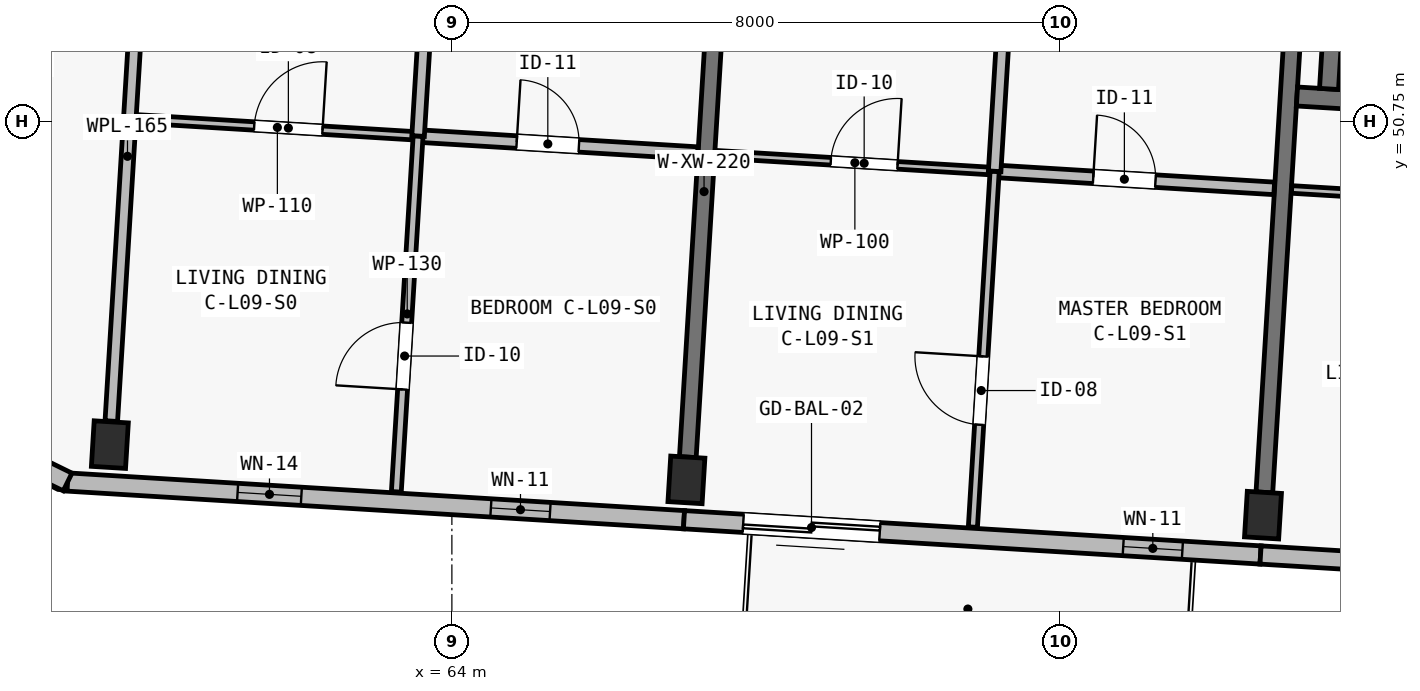
"""IFC4 building model, lengths in metres.
Left out: names, types, materials, properties, quantities, classifications, styles, units other than length and angle.
Written with IfcOpenShell. Run it as: python <this file> out.ifc"""

import sys

from ifc_helpers import new_model, si_unit, direction, frame, frame_2d, origin, origin_2d, place, context, subcontext, project, spatial, polyline, rectangle, outline, extrude, element, fill, save


model = new_model("IFC4")
c1 = context("Model", 3, precision=1e-05, world=origin(), true_north=direction((0.0, 1.0)))
c2 = subcontext(c1, "Body", "Model", "MODEL_VIEW")
j1 = project(units=[si_unit("LENGTHUNIT", "METRE"), si_unit("PLANEANGLEUNIT", "RADIAN")], contexts=[c1])
p1 = place(None, origin())
s1 = spatial("IfcSite", under=j1, at=p1, CompositionType="ELEMENT")
p2 = place(p1, origin())
s2 = spatial("IfcBuilding", under=s1, at=p2, CompositionType="ELEMENT")
p3 = place(p2, frame((0.0, 0.0, 31.15)))
s3 = spatial("IfcBuildingStorey", under=s2, at=p3, CompositionType="ELEMENT", Elevation=31.15)
p4 = place(p3, frame((59.5, 46.5, 0.0), z_axis=(0.0, 0.0, 1.0), x_axis=(0.998134798422, -0.061048539535, 0.0)))
e1 = element("IfcColumn", 1, at=p4, inside=s3, PredefinedType="COLUMN", context=c2, shape_type="SweptSolid", body=[
    extrude(rectangle(XDim=0.45, YDim=0.6, at=origin_2d()), origin(), (0.0, 0.0, 1.0), 6.895),
])
for number, where, z_axis, x_axis in (
    (2, (67.086, 46.036, 0.0), (0.0, 0.0, 1.0), (0.998, -0.061, 0.0)),
    (3, (74.672, 45.572, 0.0), (0.0, 0.0, 1.0), (0.998, -0.061, 0.0)),
):
    element("IfcColumn", number, at=place(p3, frame(where, z_axis=z_axis, x_axis=x_axis)), inside=s3, PredefinedType="COLUMN", context=c2, shape_type="SweptSolid", body=[
        extrude(rectangle(XDim=0.45, YDim=0.6, at=origin_2d()), origin(), (0.0, 0.0, 1.0), 3.25),
    ])
p5 = place(p3, frame((67.104, 46.335, 0.0), z_axis=(0.0, 0.0, 1.0), x_axis=(0.061034188237, 0.998135676081, 0.0)))
e4 = element("IfcWall", 4, at=p5, inside=s3, PredefinedType="SHEAR", context=c2, shape_type="SweptSolid", body=[
    extrude(rectangle(XDim=7.0, YDim=0.22, at=frame_2d((3.5, 0.0))), origin(), (0.0, 0.0, 1.0), 2.5),
])
p6 = place(p3, frame((74.69, 45.872, 0.0), z_axis=(0.0, 0.0, 1.0), x_axis=(0.061036313012, 0.998135546153, 0.0)))
e5 = element("IfcWall", 5, at=p6, inside=s3, PredefinedType="SHEAR", context=c2, shape_type="SweptSolid", body=[
    extrude(rectangle(XDim=7.0, YDim=0.22, at=frame_2d((3.5, 0.0))), origin(), (0.0, 0.0, 1.0), 2.5),
])
p7 = place(p3, frame((75.119, 51.08, 0.0), z_axis=(0.0, 0.0, 1.0), x_axis=(0.998133370443, -0.061071882298, 0.0)))
e6 = element("IfcWall", 6, at=p7, inside=s3, PredefinedType="SHEAR", context=c2, shape_type="SweptSolid", body=[
    extrude(rectangle(XDim=2.99, YDim=0.25, at=frame_2d((1.495, 0.0))), origin(), (0.0, 0.0, 1.0), 3.25),
])
p8 = place(p3, frame((75.541, 51.179, 0.0), z_axis=(0.0, 0.0, 1.0), x_axis=(0.061037062968, 0.998135500293, 0.0)))
e7 = element("IfcWall", 7, at=p8, inside=s3, PredefinedType="SHEAR", context=c2, shape_type="SweptSolid", body=[
    extrude(rectangle(XDim=1.7, YDim=0.25, at=frame_2d((0.85, 0.0))), origin(), (0.0, 0.0, 1.0), 3.25),
])
p9 = place(p3, frame((67.054, 45.512, 0.0), z_axis=(0.0, 0.0, 1.0), x_axis=(-0.998134248939, 0.061057522844, 0.0)))
e8 = element("IfcWall", 8, at=p9, inside=s3, PredefinedType="SOLIDWALL", context=c2, shape_type="SweptSolid", body=[
    extrude(outline(polyline([(0.0, 0.0), (8.125, 0.0), (8.125, 7.561), (0.0, 5.998), (0.0, 0.0)])), frame((0.0, 0.12, 0.0), z_axis=(0.0, -1.0, 0.0), x_axis=(1.0, 0.0, 0.0)), (0.0, 0.0, 1.0), 0.24),
])
p10 = place(p9, frame((1.765, 0.0, 0.42)))
e9 = element("IfcOpeningElement", 9, at=p10, cuts=e8, PredefinedType="OPENING", context=c2, shape_type="SweptSolid", body=[
    extrude(rectangle(XDim=0.78, YDim=2.2, at=frame_2d((0.39, 1.1))), frame((0.0, 0.135, 0.0), z_axis=(0.0, -1.0, 0.0), x_axis=(1.0, 0.0, 0.0)), (0.0, 0.0, 1.0), 0.27),
])
p11 = place(p9, frame((5.044, 0.0, 0.42)))
e10 = element("IfcOpeningElement", 10, at=p11, cuts=e8, PredefinedType="OPENING", context=c2, shape_type="SweptSolid", body=[
    extrude(rectangle(XDim=0.84, YDim=2.28, at=frame_2d((0.42, 1.14))), frame((0.0, 0.135, 0.0), z_axis=(0.0, -1.0, 0.0), x_axis=(1.0, 0.0, 0.0)), (0.0, 0.0, 1.0), 0.27),
])
p12 = place(p3, frame((74.64, 45.048, 0.0), z_axis=(0.0, 0.0, 1.0), x_axis=(-0.998135669243, 0.061034300063, 0.0)))
e11 = element("IfcWall", 11, at=p12, inside=s3, PredefinedType="SOLIDWALL", context=c2, shape_type="SweptSolid", body=[
    extrude(outline(polyline([(0.0, 0.0), (7.6, 0.0), (7.6, 5.998), (0.0, 4.535), (0.0, 0.0)])), frame((0.0, 0.12, 0.0), z_axis=(0.0, -1.0, 0.0), x_axis=(1.0, 0.0, 0.0)), (0.0, 0.0, 1.0), 0.24),
])
p13 = place(p12, frame((5.019, 0.0, 0.0)))
e12 = element("IfcOpeningElement", 12, at=p13, cuts=e11, PredefinedType="OPENING", context=c2, shape_type="SweptSolid", body=[
    extrude(rectangle(XDim=1.8, YDim=2.12, at=frame_2d((0.9, 1.06))), frame((0.0, 0.135, 0.0), z_axis=(0.0, -1.0, 0.0), x_axis=(1.0, 0.0, 0.0)), (0.0, 0.0, 1.0), 0.27),
])
p14 = place(p12, frame((1.03, 0.0, 0.46)))
e13 = element("IfcOpeningElement", 13, at=p14, cuts=e11, PredefinedType="OPENING", context=c2, shape_type="SweptSolid", body=[
    extrude(rectangle(XDim=0.78, YDim=2.2, at=frame_2d((0.39, 1.1))), frame((0.0, 0.135, 0.0), z_axis=(0.0, -1.0, 0.0), x_axis=(1.0, 0.0, 0.0)), (0.0, 0.0, 1.0), 0.27),
])
p15 = place(p3, frame((82.75, 44.552, 0.0), z_axis=(0.0, 0.0, 1.0), x_axis=(-0.998134248939, 0.061057522844, 0.0)))
e14 = element("IfcWall", 14, at=p15, inside=s3, PredefinedType="SOLIDWALL", context=c2, shape_type="SweptSolid", body=[
    extrude(outline(polyline([(0.0, 0.0), (8.125, 0.0), (8.125, 4.535), (0.0, 2.972), (0.0, 0.0)])), frame((0.0, 0.12, 0.0), z_axis=(0.0, -1.0, 0.0), x_axis=(1.0, 0.0, 0.0)), (0.0, 0.0, 1.0), 0.24),
])
p16 = place(p15, frame((1.251, 0.0, 0.52)))
e15 = element("IfcOpeningElement", 15, at=p16, cuts=e14, PredefinedType="OPENING", context=c2, shape_type="SweptSolid", body=[
    extrude(rectangle(XDim=0.68, YDim=2.24, at=frame_2d((0.34, 1.12))), frame((0.0, 0.135, 0.0), z_axis=(0.0, -1.0, 0.0), x_axis=(1.0, 0.0, 0.0)), (0.0, 0.0, 1.0), 0.27),
])
p17 = place(p15, frame((4.056, 0.0, 0.52)))
e16 = element("IfcOpeningElement", 16, at=p17, cuts=e14, PredefinedType="OPENING", context=c2, shape_type="SweptSolid", body=[
    extrude(rectangle(XDim=0.74, YDim=2.26, at=frame_2d((0.37, 1.13))), frame((0.0, 0.135, 0.0), z_axis=(0.0, -1.0, 0.0), x_axis=(1.0, 0.0, 0.0)), (0.0, 0.0, 1.0), 0.27),
])
p18 = place(p3, frame((58.944, 46.008, 0.0), z_axis=(0.0, 0.0, 1.0), x_axis=(-0.897775054318, 0.440454256246, 0.0)))
e17 = element("IfcWall", 17, at=p18, inside=s3, PredefinedType="SOLIDWALL", context=c2, shape_type="SweptSolid", body=[
    extrude(outline(polyline([(0.0, 0.0), (8.12, 0.0), (8.12, 9.003), (0.0, 7.561), (0.0, 0.0)])), frame((0.0, 0.13, 0.0), z_axis=(0.0, -1.0, 0.0), x_axis=(1.0, 0.0, 0.0)), (0.0, 0.0, 1.0), 0.26),
])
p19 = place(p18, frame((2.63, 0.0, 0.52)))
e18 = element("IfcOpeningElement", 18, at=p19, cuts=e17, PredefinedType="OPENING", context=c2, shape_type="SweptSolid", body=[
    extrude(rectangle(XDim=0.76, YDim=2.34, at=frame_2d((0.38, 1.17))), frame((0.0, 0.145, 0.0), z_axis=(0.0, -1.0, 0.0), x_axis=(1.0, 0.0, 0.0)), (0.0, 0.0, 1.0), 0.29),
])
p20 = place(p18, frame((4.531, 0.0, 0.45)))
e19 = element("IfcOpeningElement", 19, at=p20, cuts=e17, PredefinedType="OPENING", context=c2, shape_type="SweptSolid", body=[
    extrude(rectangle(XDim=0.6, YDim=2.22, at=frame_2d((0.3, 1.11))), frame((0.0, 0.145, 0.0), z_axis=(0.0, -1.0, 0.0), x_axis=(1.0, 0.0, 0.0)), (0.0, 0.0, 1.0), 0.29),
])
p21 = place(p3, frame((51.654, 49.585, 0.0), z_axis=(0.0, 0.0, 1.0), x_axis=(0.448621989068, 0.893721607059, 0.0)))
e20 = element("IfcWall", 20, at=p21, inside=s3, PredefinedType="SOLIDWALL", context=c2, shape_type="SweptSolid", body=[
    extrude(outline(polyline([(0.0, 0.0), (19.061, 0.0), (19.06, 7.561), (0.0, 9.003), (0.0, 0.0)])), frame((0.0, 0.13, 0.0), z_axis=(0.0, -1.0, 0.0), x_axis=(1.0, 0.0, 0.0)), (0.0, 0.0, 1.0), 0.26),
])
p22 = place(p21, frame((2.63, 0.0, 0.52)))
e21 = element("IfcOpeningElement", 21, at=p22, cuts=e20, PredefinedType="OPENING", context=c2, shape_type="SweptSolid", body=[
    extrude(rectangle(XDim=0.76, YDim=2.34, at=frame_2d((0.38, 1.17))), frame((0.0, 0.145, 0.0), z_axis=(0.0, -1.0, 0.0), x_axis=(1.0, 0.0, 0.0)), (0.0, 0.0, 1.0), 0.29),
])
p23 = place(p21, frame((15.47, 0.0, 0.45)))
e22 = element("IfcOpeningElement", 22, at=p23, cuts=e20, PredefinedType="OPENING", context=c2, shape_type="SweptSolid", body=[
    extrude(rectangle(XDim=0.6, YDim=2.22, at=frame_2d((0.3, 1.11))), frame((0.0, 0.145, 0.0), z_axis=(0.0, -1.0, 0.0), x_axis=(1.0, 0.0, 0.0)), (0.0, 0.0, 1.0), 0.29),
])
p24 = place(p3, frame((59.519, 46.809, 0.0), z_axis=(0.0, 0.0, 1.0), x_axis=(0.061034681366, 0.998135645927, 0.0)))
e23 = element("IfcWall", 23, at=p24, inside=s3, PredefinedType="PLUMBINGWALL", context=c2, shape_type="SweptSolid", body=[
    extrude(rectangle(XDim=6.98, YDim=0.165, at=frame_2d((3.49, 0.0))), origin(), (0.0, 0.0, 1.0), 3.15),
])
p25 = place(p3, frame((59.852, 50.786, 0.0), z_axis=(0.0, 0.0, 1.0), x_axis=(0.998137662841, -0.061001688651, 0.0)))
e24 = element("IfcWall", 24, at=p25, inside=s3, PredefinedType="PARTITIONING", context=c2, shape_type="SweptSolid", body=[
    extrude(rectangle(XDim=3.71, YDim=0.11, at=frame_2d((1.855, 0.0))), origin(), (0.0, 0.0, 1.0), 3.15),
])
p26 = place(p25, frame((1.55, 0.0, 0.0)))
e25 = element("IfcOpeningElement", 25, at=p26, cuts=e24, PredefinedType="OPENING", context=c2, shape_type="SweptSolid", body=[
    extrude(rectangle(XDim=0.9, YDim=2.1, at=frame_2d((0.45, 1.05))), frame((0.0, 0.07, 0.0), z_axis=(0.0, -1.0, 0.0), x_axis=(1.0, 0.0, 0.0)), (0.0, 0.0, 1.0), 0.14),
])
p27 = place(p3, frame((63.555, 50.56, 0.0), z_axis=(0.0, 0.0, 1.0), x_axis=(0.998132682596, -0.061083123148, 0.0)))
e26 = element("IfcWall", 26, at=p27, inside=s3, PredefinedType="PLUMBINGWALL", context=c2, shape_type="SweptSolid", body=[
    extrude(rectangle(XDim=3.685, YDim=0.165, at=frame_2d((1.843, 0.0))), origin(), (0.0, 0.0, 1.0), 3.15),
])
p28 = place(p27, frame((1.3, 0.0, 0.0)))
e27 = element("IfcOpeningElement", 27, at=p28, cuts=e26, PredefinedType="OPENING", context=c2, shape_type="SweptSolid", body=[
    extrude(rectangle(XDim=0.82, YDim=2.08, at=frame_2d((0.41, 1.04))), frame((0.0, 0.097, 0.0), z_axis=(0.0, -1.0, 0.0), x_axis=(1.0, 0.0, 0.0)), (0.0, 0.0, 1.0), 0.195),
])
p29 = place(p3, frame((63.269, 45.879, 0.0), z_axis=(0.0, 0.0, 1.0), x_axis=(0.061059262019, 0.998134142549, 0.0)))
e28 = element("IfcWall", 28, at=p29, inside=s3, PredefinedType="PARTITIONING", context=c2, shape_type="SweptSolid", body=[
    extrude(rectangle(XDim=4.69, YDim=0.13, at=frame_2d((2.345, 0.0))), origin(), (0.0, 0.0, 1.0), 3.15),
])
p30 = place(p29, frame((1.35, 0.0, 0.0)))
e29 = element("IfcOpeningElement", 29, at=p30, cuts=e28, PredefinedType="OPENING", context=c2, shape_type="SweptSolid", body=[
    extrude(rectangle(XDim=0.88, YDim=2.1, at=frame_2d((0.44, 1.05))), frame((0.0, 0.08, 0.0), z_axis=(0.0, -1.0, 0.0), x_axis=(1.0, 0.0, 0.0)), (0.0, 0.0, 1.0), 0.16),
])
p31 = place(p3, frame((63.555, 50.56, 0.0), z_axis=(0.0, 0.0, 1.0), x_axis=(0.061038003798, 0.998135442759, 0.0)))
e30 = element("IfcWall", 30, at=p31, inside=s3, PredefinedType="PLUMBINGWALL", context=c2, shape_type="SweptSolid", body=[
    extrude(rectangle(XDim=3.72, YDim=0.165, at=frame_2d((1.86, 0.0))), origin(), (0.0, 0.0, 1.0), 3.15),
])
p32 = place(p3, frame((67.463, 50.321, 0.0), z_axis=(0.0, 0.0, 1.0), x_axis=(0.998132682596, -0.061083123148, 0.0)))
e31 = element("IfcWall", 31, at=p32, inside=s3, PredefinedType="PARTITIONING", context=c2, shape_type="SweptSolid", body=[
    extrude(rectangle(XDim=3.685, YDim=0.1, at=frame_2d((1.843, 0.0))), origin(), (0.0, 0.0, 1.0), 3.15),
])
p33 = place(p32, frame((1.525, 0.0, 0.0)))
e32 = element("IfcOpeningElement", 32, at=p33, cuts=e31, PredefinedType="OPENING", context=c2, shape_type="SweptSolid", body=[
    extrude(rectangle(XDim=0.88, YDim=2.1, at=frame_2d((0.44, 1.05))), frame((0.0, 0.065, 0.0), z_axis=(0.0, -1.0, 0.0), x_axis=(1.0, 0.0, 0.0)), (0.0, 0.0, 1.0), 0.13),
])
p34 = place(p3, frame((71.141, 50.096, 0.0), z_axis=(0.0, 0.0, 1.0), x_axis=(0.998136472989, -0.061021154439, 0.0)))
e33 = element("IfcWall", 33, at=p34, inside=s3, PredefinedType="PLUMBINGWALL", context=c2, shape_type="SweptSolid", body=[
    extrude(rectangle(XDim=3.685, YDim=0.165, at=frame_2d((1.842, 0.0))), origin(), (0.0, 0.0, 1.0), 3.15),
])
p35 = place(p34, frame((1.3, 0.0, 0.0)))
e34 = element("IfcOpeningElement", 34, at=p35, cuts=e33, PredefinedType="OPENING", context=c2, shape_type="SweptSolid", body=[
    extrude(rectangle(XDim=0.82, YDim=2.08, at=frame_2d((0.41, 1.04))), frame((0.0, 0.097, 0.0), z_axis=(0.0, -1.0, 0.0), x_axis=(1.0, 0.0, 0.0)), (0.0, 0.0, 1.0), 0.195),
])
p36 = place(p3, frame((70.855, 45.415, 0.0), z_axis=(0.0, 0.0, 1.0), x_axis=(0.061062434628, 0.998133948465, 0.0)))
e35 = element("IfcWall", 35, at=p36, inside=s3, PredefinedType="PARTITIONING", context=c2, shape_type="SweptSolid", body=[
    extrude(rectangle(XDim=4.69, YDim=0.12, at=frame_2d((2.345, 0.0))), origin(), (0.0, 0.0, 1.0), 3.15),
])
p37 = place(p36, frame((1.35, 0.0, 0.0)))
e36 = element("IfcOpeningElement", 36, at=p37, cuts=e35, PredefinedType="OPENING", context=c2, shape_type="SweptSolid", body=[
    extrude(rectangle(XDim=0.9, YDim=2.1, at=frame_2d((0.45, 1.05))), frame((0.0, 0.075, 0.0), z_axis=(0.0, -1.0, 0.0), x_axis=(1.0, 0.0, 0.0)), (0.0, 0.0, 1.0), 0.15),
])
p38 = place(p3, frame((71.141, 50.096, 0.0), z_axis=(0.0, 0.0, 1.0), x_axis=(0.061034005467, 0.998135687257, 0.0)))
e37 = element("IfcWall", 37, at=p38, inside=s3, PredefinedType="PLUMBINGWALL", context=c2, shape_type="SweptSolid", body=[
    extrude(rectangle(XDim=3.72, YDim=0.165, at=frame_2d((1.86, 0.0))), origin(), (0.0, 0.0, 1.0), 3.15),
])
p39 = place(p3, frame((75.049, 49.857, 0.0), z_axis=(0.0, 0.0, 1.0), x_axis=(0.998135637207, -0.061034823981, 0.0)))
e38 = element("IfcWall", 38, at=p39, inside=s3, PredefinedType="PARTITIONING", context=c2, shape_type="SweptSolid", body=[
    extrude(rectangle(XDim=5.08, YDim=0.1, at=frame_2d((2.54, 0.0))), origin(), (0.0, 0.0, 1.0), 3.018),
])
p40 = place(p39, frame((3.595, 0.0, 0.0)))
e39 = element("IfcOpeningElement", 39, at=p40, cuts=e38, PredefinedType="OPENING", context=c2, shape_type="SweptSolid", body=[
    extrude(rectangle(XDim=0.88, YDim=2.1, at=frame_2d((0.44, 1.05))), frame((0.0, 0.065, 0.0), z_axis=(0.0, -1.0, 0.0), x_axis=(1.0, 0.0, 0.0)), (0.0, 0.0, 1.0), 0.13),
])
p41 = place(p10, origin())
e40 = element("IfcWindow", 40, at=p41, inside=s3, PartitioningType="SINGLE_PANEL", PredefinedType="WINDOW", context=c2, shape_type="SweptSolid", body=[
    extrude(rectangle(XDim=0.78, YDim=2.2, at=frame_2d((0.39, 1.1))), frame((0.0, 0.03, 0.0), z_axis=(0.0, -1.0, 0.0), x_axis=(1.0, 0.0, 0.0)), (0.0, 0.0, 1.0), 0.06),
])
fill(e9, e40)
p42 = place(p11, origin())
e41 = element("IfcWindow", 41, at=p42, inside=s3, PartitioningType="SINGLE_PANEL", PredefinedType="WINDOW", context=c2, shape_type="SweptSolid", body=[
    extrude(rectangle(XDim=0.84, YDim=2.28, at=frame_2d((0.42, 1.14))), frame((0.0, 0.03, 0.0), z_axis=(0.0, -1.0, 0.0), x_axis=(1.0, 0.0, 0.0)), (0.0, 0.0, 1.0), 0.06),
])
fill(e10, e41)
p43 = place(p13, origin())
e42 = element("IfcDoor", 42, at=p43, inside=s3, OperationType="SLIDING_TO_LEFT", PredefinedType="DOOR", context=c2, shape_type="SweptSolid", body=[
    extrude(rectangle(XDim=1.8, YDim=2.12, at=frame_2d((0.9, 1.06))), frame((0.0, 0.025, 0.0), z_axis=(0.0, -1.0, 0.0), x_axis=(1.0, 0.0, 0.0)), (0.0, 0.0, 1.0), 0.05),
])
fill(e12, e42)
p44 = place(p14, origin())
e43 = element("IfcWindow", 43, at=p44, inside=s3, PartitioningType="SINGLE_PANEL", PredefinedType="WINDOW", context=c2, shape_type="SweptSolid", body=[
    extrude(rectangle(XDim=0.78, YDim=2.2, at=frame_2d((0.39, 1.1))), frame((0.0, 0.03, 0.0), z_axis=(0.0, -1.0, 0.0), x_axis=(1.0, 0.0, 0.0)), (0.0, 0.0, 1.0), 0.06),
])
fill(e13, e43)
p45 = place(p26, origin())
e44 = element("IfcDoor", 44, at=p45, inside=s3, OperationType="SINGLE_SWING_RIGHT", PredefinedType="DOOR", context=c2, shape_type="SweptSolid", body=[
    extrude(rectangle(XDim=0.9, YDim=2.1, at=frame_2d((0.45, 1.05))), frame((0.0, 0.025, 0.0), z_axis=(0.0, -1.0, 0.0), x_axis=(1.0, 0.0, 0.0)), (0.0, 0.0, 1.0), 0.05),
])
fill(e25, e44)
p46 = place(p28, origin())
e45 = element("IfcDoor", 45, at=p46, inside=s3, OperationType="SINGLE_SWING_LEFT", PredefinedType="DOOR", context=c2, shape_type="SweptSolid", body=[
    extrude(rectangle(XDim=0.82, YDim=2.08, at=frame_2d((0.41, 1.04))), frame((0.0, 0.025, 0.0), z_axis=(0.0, -1.0, 0.0), x_axis=(1.0, 0.0, 0.0)), (0.0, 0.0, 1.0), 0.05),
])
fill(e27, e45)
p47 = place(p30, origin())
e46 = element("IfcDoor", 46, at=p47, inside=s3, OperationType="SINGLE_SWING_LEFT", PredefinedType="DOOR", context=c2, shape_type="SweptSolid", body=[
    extrude(rectangle(XDim=0.88, YDim=2.1, at=frame_2d((0.44, 1.05))), frame((0.0, 0.025, 0.0), z_axis=(0.0, -1.0, 0.0), x_axis=(1.0, 0.0, 0.0)), (0.0, 0.0, 1.0), 0.05),
])
fill(e29, e46)
p48 = place(p33, origin())
e47 = element("IfcDoor", 47, at=p48, inside=s3, OperationType="SINGLE_SWING_RIGHT", PredefinedType="DOOR", context=c2, shape_type="SweptSolid", body=[
    extrude(rectangle(XDim=0.88, YDim=2.1, at=frame_2d((0.44, 1.05))), frame((0.0, 0.025, 0.0), z_axis=(0.0, -1.0, 0.0), x_axis=(1.0, 0.0, 0.0)), (0.0, 0.0, 1.0), 0.05),
])
fill(e32, e47)
p49 = place(p35, origin())
e48 = element("IfcDoor", 48, at=p49, inside=s3, OperationType="SINGLE_SWING_LEFT", PredefinedType="DOOR", context=c2, shape_type="SweptSolid", body=[
    extrude(rectangle(XDim=0.82, YDim=2.08, at=frame_2d((0.41, 1.04))), frame((0.0, 0.025, 0.0), z_axis=(0.0, -1.0, 0.0), x_axis=(1.0, 0.0, 0.0)), (0.0, 0.0, 1.0), 0.05),
])
fill(e34, e48)
p50 = place(p37, origin())
e49 = element("IfcDoor", 49, at=p50, inside=s3, OperationType="SINGLE_SWING_RIGHT", PredefinedType="DOOR", context=c2, shape_type="SweptSolid", body=[
    extrude(rectangle(XDim=0.9, YDim=2.1, at=frame_2d((0.45, 1.05))), frame((0.0, 0.025, 0.0), z_axis=(0.0, -1.0, 0.0), x_axis=(1.0, 0.0, 0.0)), (0.0, 0.0, 1.0), 0.05),
])
fill(e36, e49)
save(model, sys.argv[1])
